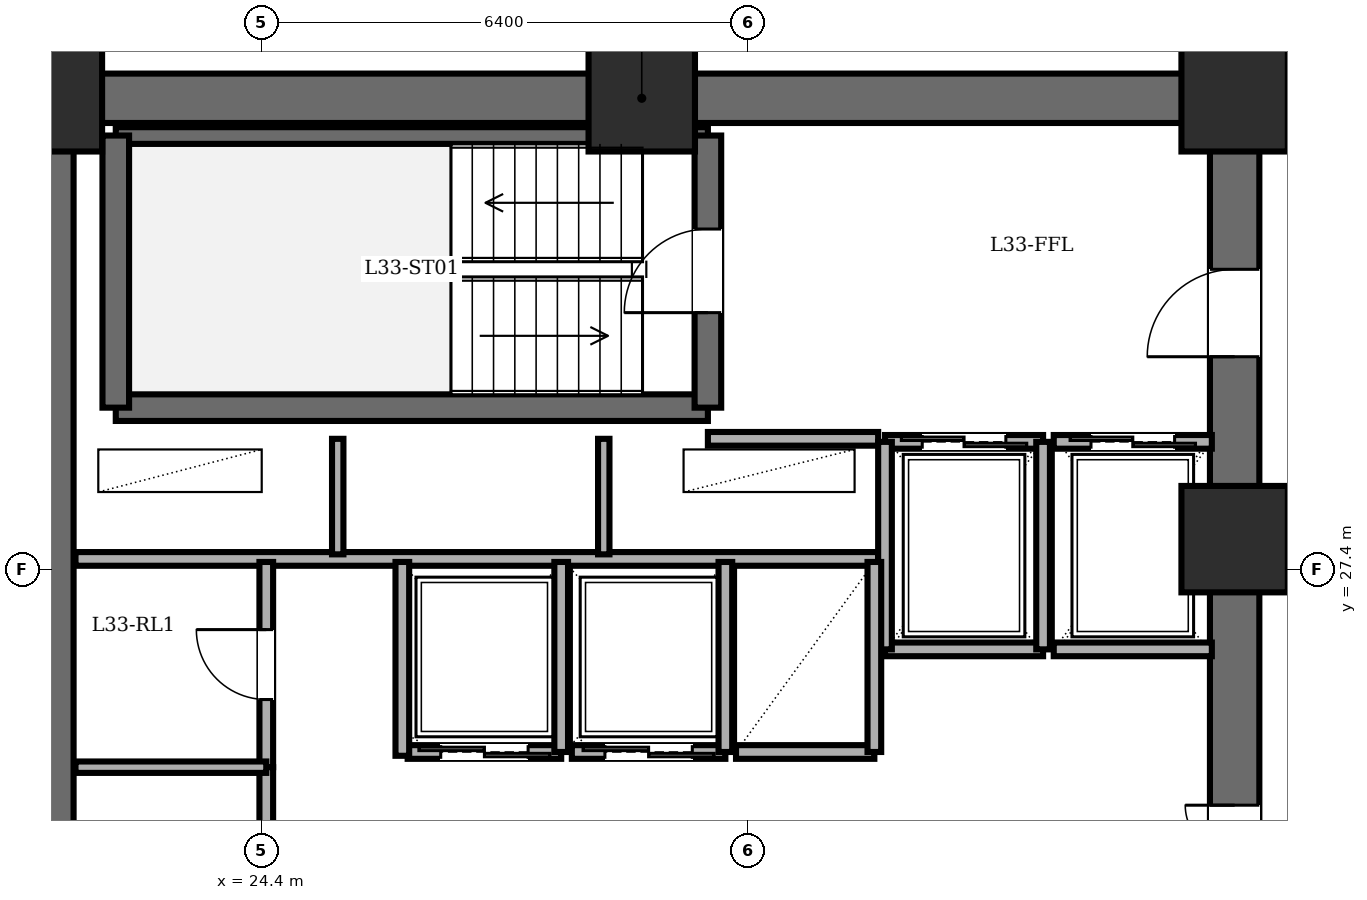
"""IFC4 building model, lengths in metres.
Left out: names, types, materials, properties, quantities, classifications, styles, units other than length and angle.
Written with IfcOpenShell. Run it as: python <this file> out.ifc"""

import sys

from ifc_helpers import new_model, si_unit, direction, frame, frame_2d, origin, origin_2d, place, context, subcontext, project, spatial, rectangle, extrude, element, fill, save


model = new_model("IFC4")
c1 = context("Model", 3, precision=1e-05, world=origin(), true_north=direction((0.0, 1.0)))
c2 = subcontext(c1, "Body", "Model", "MODEL_VIEW")
j1 = project(units=[si_unit("LENGTHUNIT", "METRE"), si_unit("PLANEANGLEUNIT", "RADIAN")], contexts=[c1])
p1 = place(None, origin())
s1 = spatial("IfcSite", under=j1, at=p1, CompositionType="ELEMENT")
p2 = place(p1, origin())
s2 = spatial("IfcBuilding", under=s1, at=p2, CompositionType="ELEMENT")
p3 = place(p2, frame((0.0, 0.0, 125.9)))
s3 = spatial("IfcBuildingStorey", under=s2, at=p3, CompositionType="ELEMENT", Elevation=125.9)
for number, where, z_axis, x_axis in (
    (1, (37.2, 27.8, 0.0), (0.0, 0.0, 1.0), (1.0, 0.0, 0.0)),
    (2, (37.2, 33.6, 0.0), (0.0, 0.0, 1.0), (1.0, 0.0, 0.0)),
    (3, (29.4, 33.6, 0.0), (0.0, 0.0, 1.0), (1.0, 0.0, 0.0)),
    (4, (21.6, 33.6, 0.0), (0.0, 0.0, 1.0), (1.0, 0.0, 0.0)),
):
    element("IfcColumn", number, at=place(p3, frame(where, z_axis=z_axis, x_axis=x_axis)), inside=s3, PredefinedType="COLUMN", context=c2, shape_type="SweptSolid", body=[
        extrude(rectangle(XDim=1.4, YDim=1.4, at=origin_2d()), origin(), (0.0, 0.0, 1.0), 3.6),
    ])
p4 = place(p3, frame((21.6, 14.4, 0.0), z_axis=(0.0, 0.0, 1.0), x_axis=(0.0, 1.0, 0.0)))
e5 = element("IfcWall", 5, at=p4, inside=s3, PredefinedType="SHEAR", context=c2, shape_type="SweptSolid", body=[
    extrude(rectangle(XDim=19.2, YDim=0.65, at=frame_2d((9.6, 0.0))), origin(), (0.0, 0.0, 1.0), 3.4),
])
p5 = place(p3, frame((21.6, 33.6, 0.0), z_axis=(0.0, 0.0, 1.0), x_axis=(1.0, 0.0, 0.0)))
e6 = element("IfcWall", 6, at=p5, inside=s3, PredefinedType="SHEAR", context=c2, shape_type="SweptSolid", body=[
    extrude(rectangle(XDim=15.6, YDim=0.65, at=frame_2d((7.8, 0.0))), origin(), (0.0, 0.0, 1.0), 3.4),
])
p6 = place(p3, frame((37.2, 14.4, 0.0), z_axis=(0.0, 0.0, 1.0), x_axis=(0.0, 1.0, 0.0)))
e7 = element("IfcWall", 7, at=p6, inside=s3, PredefinedType="SHEAR", context=c2, shape_type="SweptSolid", body=[
    extrude(rectangle(XDim=19.2, YDim=0.65, at=frame_2d((9.6, 0.0))), origin(), (0.0, 0.0, 1.0), 3.4),
])
p7 = place(p6, frame((15.8, 0.0, 0.0)))
e8 = element("IfcOpeningElement", 8, at=p7, cuts=e7, PredefinedType="OPENING", context=c2, shape_type="SweptSolid", body=[
    extrude(rectangle(XDim=1.15, YDim=2.15, at=frame_2d((0.575, 1.075))), frame((0.0, 0.335, 0.0), z_axis=(0.0, -1.0, 0.0), x_axis=(1.0, 0.0, 0.0)), (0.0, 0.0, 1.0), 0.67),
])
p8 = place(p6, frame((3.6, 0.0, 0.0)))
e9 = element("IfcOpeningElement", 9, at=p8, cuts=e7, PredefinedType="OPENING", context=c2, shape_type="SweptSolid", body=[
    extrude(rectangle(XDim=1.1, YDim=2.15, at=frame_2d((0.55, 1.075))), frame((0.0, 0.335, 0.0), z_axis=(0.0, -1.0, 0.0), x_axis=(1.0, 0.0, 0.0)), (0.0, 0.0, 1.0), 0.67),
])
p9 = place(p6, frame((8.6, 0.0, 0.0)))
e10 = element("IfcOpeningElement", 10, at=p9, cuts=e7, PredefinedType="OPENING", context=c2, shape_type="SweptSolid", body=[
    extrude(rectangle(XDim=1.3, YDim=2.2, at=frame_2d((0.65, 1.1))), frame((0.0, 0.335, 0.0), z_axis=(0.0, -1.0, 0.0), x_axis=(1.0, 0.0, 0.0)), (0.0, 0.0, 1.0), 0.67),
])
p10 = place(p3, frame((22.48, 29.53, 0.0), z_axis=(0.0, 0.0, 1.0), x_axis=(1.0, 0.0, 0.0)))
e11 = element("IfcWall", 11, at=p10, inside=s3, PredefinedType="SOLIDWALL", context=c2, shape_type="SweptSolid", body=[
    extrude(rectangle(XDim=7.79, YDim=0.35, at=frame_2d((3.895, 0.0))), origin(), (0.0, 0.0, 1.0), 3.4),
])
p11 = place(p3, frame((22.48, 33.11, 0.0), z_axis=(0.0, 0.0, 1.0), x_axis=(1.0, 0.0, 0.0)))
e12 = element("IfcWall", 12, at=p11, inside=s3, PredefinedType="PARTITIONING", context=c2, shape_type="SweptSolid", body=[
    extrude(rectangle(XDim=7.79, YDim=0.22, at=frame_2d((3.895, 0.0))), origin(), (0.0, 0.0, 1.0), 3.4),
])
p12 = place(p3, frame((22.48, 29.53, 0.0), z_axis=(0.0, 0.0, 1.0), x_axis=(0.0, 1.0, 0.0)))
e13 = element("IfcWall", 13, at=p12, inside=s3, PredefinedType="SOLIDWALL", context=c2, shape_type="SweptSolid", body=[
    extrude(rectangle(XDim=3.58, YDim=0.35, at=frame_2d((1.79, 0.0))), origin(), (0.0, 0.0, 1.0), 3.4),
])
p13 = place(p3, frame((30.27, 29.53, 0.0), z_axis=(0.0, 0.0, 1.0), x_axis=(0.0, 1.0, 0.0)))
e14 = element("IfcWall", 14, at=p13, inside=s3, PredefinedType="SOLIDWALL", context=c2, shape_type="SweptSolid", body=[
    extrude(rectangle(XDim=3.58, YDim=0.35, at=frame_2d((1.79, 0.0))), origin(), (0.0, 0.0, 1.0), 3.4),
])
p14 = place(p13, frame((1.25, 0.0, 0.0)))
e15 = element("IfcOpeningElement", 15, at=p14, cuts=e14, PredefinedType="OPENING", context=c2, shape_type="SweptSolid", body=[
    extrude(rectangle(XDim=1.1, YDim=2.15, at=frame_2d((0.55, 1.075))), frame((0.0, 0.185, 0.0), z_axis=(0.0, -1.0, 0.0), x_axis=(1.0, 0.0, 0.0)), (0.0, 0.0, 1.0), 0.37),
])
p15 = place(p3, frame((30.27, 29.12, 0.0), z_axis=(0.0, 0.0, 1.0), x_axis=(1.0, 0.0, 0.0)))
e16 = element("IfcWall", 16, at=p15, inside=s3, PredefinedType="PARTITIONING", context=c2, shape_type="SweptSolid", body=[
    extrude(rectangle(XDim=2.24, YDim=0.18, at=frame_2d((1.12, 0.0))), origin(), (0.0, 0.0, 1.0), 3.4),
])
p16 = place(p3, frame((21.95, 27.54, 0.0), z_axis=(0.0, 0.0, 1.0), x_axis=(1.0, 0.0, 0.0)))
e17 = element("IfcWall", 17, at=p16, inside=s3, PredefinedType="PARTITIONING", context=c2, shape_type="SweptSolid", body=[
    extrude(rectangle(XDim=10.56, YDim=0.18, at=frame_2d((5.28, 0.0))), origin(), (0.0, 0.0, 1.0), 3.4),
])
for number, where, z_axis, x_axis in (
    (18, (25.4, 27.6, 0.0), (0.0, 0.0, 1.0), (0.0, 1.0, 0.0)),
    (19, (28.9, 27.6, 0.0), (0.0, 0.0, 1.0), (0.0, 1.0, 0.0)),
):
    element("IfcWall", number, at=place(p3, frame(where, z_axis=z_axis, x_axis=x_axis)), inside=s3, PredefinedType="PARTITIONING", context=c2, shape_type="SweptSolid", body=[
        extrude(rectangle(XDim=1.52, YDim=0.15, at=frame_2d((0.76, 0.0))), origin(), (0.0, 0.0, 1.0), 3.4),
    ])
p17 = place(p3, frame((32.6, 29.08, 0.0), z_axis=(0.0, 0.0, 1.0), x_axis=(1.0, 0.0, 0.0)))
e20 = element("IfcWall", 20, at=p17, inside=s3, PredefinedType="PARTITIONING", context=c2, shape_type="SweptSolid", body=[
    extrude(rectangle(XDim=2.08, YDim=0.18, at=frame_2d((1.04, 0.0))), origin(), (0.0, 0.0, 1.0), 3.4),
])
p18 = place(p17, frame((0.49, 0.0, 0.0)))
e21 = element("IfcOpeningElement", 21, at=p18, cuts=e20, PredefinedType="OPENING", context=c2, shape_type="SweptSolid", body=[
    extrude(rectangle(XDim=1.1, YDim=2.2, at=frame_2d((0.55, 1.1))), frame((0.0, 0.1, 0.0), z_axis=(0.0, -1.0, 0.0), x_axis=(1.0, 0.0, 0.0)), (0.0, 0.0, 1.0), 0.2),
])
p19 = place(p3, frame((34.68, 26.35, 0.0), z_axis=(0.0, 0.0, 1.0), x_axis=(-1.0, 0.0, 0.0)))
e22 = element("IfcWall", 22, at=p19, inside=s3, PredefinedType="PARTITIONING", context=c2, shape_type="SweptSolid", body=[
    extrude(rectangle(XDim=2.08, YDim=0.18, at=frame_2d((1.04, 0.0))), origin(), (0.0, 0.0, 1.0), 3.4),
])
for number, where, z_axis, x_axis in (
    (23, (34.68, 26.35, 0.0), (0.0, 0.0, 1.0), (0.0, 1.0, 0.0)),
    (24, (32.6, 29.08, 0.0), (0.0, 0.0, 1.0), (0.0, -1.0, 0.0)),
):
    element("IfcWall", number, at=place(p3, frame(where, z_axis=z_axis, x_axis=x_axis)), inside=s3, PredefinedType="PARTITIONING", context=c2, shape_type="SweptSolid", body=[
        extrude(rectangle(XDim=2.73, YDim=0.18, at=frame_2d((1.365, 0.0))), origin(), (0.0, 0.0, 1.0), 3.4),
    ])
p20 = place(p3, frame((34.82, 29.08, 0.0), z_axis=(0.0, 0.0, 1.0), x_axis=(1.0, 0.0, 0.0)))
e25 = element("IfcWall", 25, at=p20, inside=s3, PredefinedType="PARTITIONING", context=c2, shape_type="SweptSolid", body=[
    extrude(rectangle(XDim=2.08, YDim=0.18, at=frame_2d((1.04, 0.0))), origin(), (0.0, 0.0, 1.0), 3.4),
])
p21 = place(p20, frame((0.49, 0.0, 0.0)))
e26 = element("IfcOpeningElement", 26, at=p21, cuts=e25, PredefinedType="OPENING", context=c2, shape_type="SweptSolid", body=[
    extrude(rectangle(XDim=1.1, YDim=2.2, at=frame_2d((0.55, 1.1))), frame((0.0, 0.1, 0.0), z_axis=(0.0, -1.0, 0.0), x_axis=(1.0, 0.0, 0.0)), (0.0, 0.0, 1.0), 0.2),
])
p22 = place(p3, frame((36.9, 26.35, 0.0), z_axis=(0.0, 0.0, 1.0), x_axis=(-1.0, 0.0, 0.0)))
e27 = element("IfcWall", 27, at=p22, inside=s3, PredefinedType="PARTITIONING", context=c2, shape_type="SweptSolid", body=[
    extrude(rectangle(XDim=2.08, YDim=0.18, at=frame_2d((1.04, 0.0))), origin(), (0.0, 0.0, 1.0), 3.4),
])
p23 = place(p3, frame((28.34, 25.0, 0.0), z_axis=(0.0, 0.0, 1.0), x_axis=(-1.0, 0.0, 0.0)))
e28 = element("IfcWall", 28, at=p23, inside=s3, PredefinedType="PARTITIONING", context=c2, shape_type="SweptSolid", body=[
    extrude(rectangle(XDim=2.02, YDim=0.18, at=frame_2d((1.01, 0.0))), origin(), (0.0, 0.0, 1.0), 3.4),
])
p24 = place(p23, frame((0.435, 0.0, 0.0)))
e29 = element("IfcOpeningElement", 29, at=p24, cuts=e28, PredefinedType="OPENING", context=c2, shape_type="SweptSolid", body=[
    extrude(rectangle(XDim=1.15, YDim=2.2, at=frame_2d((0.575, 1.1))), frame((0.0, 0.1, 0.0), z_axis=(0.0, -1.0, 0.0), x_axis=(1.0, 0.0, 0.0)), (0.0, 0.0, 1.0), 0.2),
])
p25 = place(p3, frame((28.34, 25.0, 0.0), z_axis=(0.0, 0.0, 1.0), x_axis=(0.0, 1.0, 0.0)))
e30 = element("IfcWall", 30, at=p25, inside=s3, PredefinedType="PARTITIONING", context=c2, shape_type="SweptSolid", body=[
    extrude(rectangle(XDim=2.5, YDim=0.18, at=frame_2d((1.25, 0.0))), origin(), (0.0, 0.0, 1.0), 3.4),
])
p26 = place(p3, frame((30.5, 25.0, 0.0), z_axis=(0.0, 0.0, 1.0), x_axis=(-1.0, 0.0, 0.0)))
e31 = element("IfcWall", 31, at=p26, inside=s3, PredefinedType="PARTITIONING", context=c2, shape_type="SweptSolid", body=[
    extrude(rectangle(XDim=2.02, YDim=0.18, at=frame_2d((1.01, 0.0))), origin(), (0.0, 0.0, 1.0), 3.4),
])
p27 = place(p26, frame((0.435, 0.0, 0.0)))
e32 = element("IfcOpeningElement", 32, at=p27, cuts=e31, PredefinedType="OPENING", context=c2, shape_type="SweptSolid", body=[
    extrude(rectangle(XDim=1.15, YDim=2.2, at=frame_2d((0.575, 1.1))), frame((0.0, 0.1, 0.0), z_axis=(0.0, -1.0, 0.0), x_axis=(1.0, 0.0, 0.0)), (0.0, 0.0, 1.0), 0.2),
])
p28 = place(p3, frame((30.5, 25.0, 0.0), z_axis=(0.0, 0.0, 1.0), x_axis=(0.0, 1.0, 0.0)))
e33 = element("IfcWall", 33, at=p28, inside=s3, PredefinedType="PARTITIONING", context=c2, shape_type="SweptSolid", body=[
    extrude(rectangle(XDim=2.5, YDim=0.18, at=frame_2d((1.25, 0.0))), origin(), (0.0, 0.0, 1.0), 3.4),
])
p29 = place(p3, frame((32.46, 25.0, 0.0), z_axis=(0.0, 0.0, 1.0), x_axis=(-1.0, 0.0, 0.0)))
e34 = element("IfcWall", 34, at=p29, inside=s3, PredefinedType="PARTITIONING", context=c2, shape_type="SweptSolid", body=[
    extrude(rectangle(XDim=1.82, YDim=0.18, at=frame_2d((0.91, 0.0))), origin(), (0.0, 0.0, 1.0), 3.4),
])
p30 = place(p3, frame((32.46, 25.0, 0.0), z_axis=(0.0, 0.0, 1.0), x_axis=(0.0, 1.0, 0.0)))
e35 = element("IfcWall", 35, at=p30, inside=s3, PredefinedType="PARTITIONING", context=c2, shape_type="SweptSolid", body=[
    extrude(rectangle(XDim=2.5, YDim=0.18, at=frame_2d((1.25, 0.0))), origin(), (0.0, 0.0, 1.0), 3.4),
])
p31 = place(p3, frame((24.46, 24.8, 0.0), z_axis=(0.0, 0.0, 1.0), x_axis=(0.0, 1.0, 0.0)))
e36 = element("IfcWall", 36, at=p31, inside=s3, PredefinedType="PARTITIONING", context=c2, shape_type="SweptSolid", body=[
    extrude(rectangle(XDim=2.7, YDim=0.18, at=frame_2d((1.35, 0.0))), origin(), (0.0, 0.0, 1.0), 3.4),
])
p32 = place(p31, frame((0.89, 0.0, 0.0)))
e37 = element("IfcOpeningElement", 37, at=p32, cuts=e36, PredefinedType="OPENING", context=c2, shape_type="SweptSolid", body=[
    extrude(rectangle(XDim=0.92, YDim=2.1, at=frame_2d((0.46, 1.05))), frame((0.0, 0.1, 0.0), z_axis=(0.0, -1.0, 0.0), x_axis=(1.0, 0.0, 0.0)), (0.0, 0.0, 1.0), 0.2),
])
p33 = place(p3, frame((24.46, 19.8, 0.0), z_axis=(0.0, 0.0, 1.0), x_axis=(0.0, 1.0, 0.0)))
e38 = element("IfcWall", 38, at=p33, inside=s3, PredefinedType="PARTITIONING", context=c2, shape_type="SweptSolid", body=[
    extrude(rectangle(XDim=5.0, YDim=0.18, at=frame_2d((2.5, 0.0))), origin(), (0.0, 0.0, 1.0), 3.4),
])
p34 = place(p33, frame((2.04, 0.0, 0.0)))
e39 = element("IfcOpeningElement", 39, at=p34, cuts=e38, PredefinedType="OPENING", context=c2, shape_type="SweptSolid", body=[
    extrude(rectangle(XDim=0.92, YDim=2.1, at=frame_2d((0.46, 1.05))), frame((0.0, 0.1, 0.0), z_axis=(0.0, -1.0, 0.0), x_axis=(1.0, 0.0, 0.0)), (0.0, 0.0, 1.0), 0.2),
])
p35 = place(p3, frame((21.95, 24.8, 0.0), z_axis=(0.0, 0.0, 1.0), x_axis=(1.0, 0.0, 0.0)))
e40 = element("IfcWall", 40, at=p35, inside=s3, PredefinedType="PARTITIONING", context=c2, shape_type="SweptSolid", body=[
    extrude(rectangle(XDim=2.51, YDim=0.15, at=frame_2d((1.255, 0.0))), origin(), (0.0, 0.0, 1.0), 3.4),
])
p36 = place(p3, frame((26.25, 24.95, 0.0), z_axis=(0.0, 0.0, 1.0), x_axis=(0.0, 1.0, 0.0)))
e41 = element("IfcWall", 41, at=p36, inside=s3, PredefinedType="PARTITIONING", context=c2, shape_type="SweptSolid", body=[
    extrude(rectangle(XDim=2.55, YDim=0.18, at=frame_2d((1.275, 0.0))), origin(), (0.0, 0.0, 1.0), 3.4),
])
p37 = place(p14, origin())
e42 = element("IfcDoor", 42, at=p37, inside=s3, OperationType="SINGLE_SWING_LEFT", PredefinedType="DOOR", context=c2, shape_type="SweptSolid", body=[
    extrude(rectangle(XDim=1.1, YDim=2.15, at=frame_2d((0.55, 1.075))), frame((0.0, 0.025, 0.0), z_axis=(0.0, -1.0, 0.0), x_axis=(1.0, 0.0, 0.0)), (0.0, 0.0, 1.0), 0.05),
])
fill(e15, e42)
p38 = place(p7, origin())
e43 = element("IfcDoor", 43, at=p38, inside=s3, OperationType="SINGLE_SWING_LEFT", PredefinedType="DOOR", context=c2, shape_type="SweptSolid", body=[
    extrude(rectangle(XDim=1.15, YDim=2.15, at=frame_2d((0.575, 1.075))), frame((0.0, 0.025, 0.0), z_axis=(0.0, -1.0, 0.0), x_axis=(1.0, 0.0, 0.0)), (0.0, 0.0, 1.0), 0.05),
])
fill(e8, e43)
p39 = place(p18, origin())
e44 = element("IfcDoor", 44, at=p39, inside=s3, OperationType="DOUBLE_DOOR_SLIDING", PredefinedType="DOOR", context=c2, shape_type="SweptSolid", body=[
    extrude(rectangle(XDim=1.1, YDim=2.2, at=frame_2d((0.55, 1.1))), frame((0.0, 0.025, 0.0), z_axis=(0.0, -1.0, 0.0), x_axis=(1.0, 0.0, 0.0)), (0.0, 0.0, 1.0), 0.05),
])
fill(e21, e44)
p40 = place(p21, origin())
e45 = element("IfcDoor", 45, at=p40, inside=s3, OperationType="DOUBLE_DOOR_SLIDING", PredefinedType="DOOR", context=c2, shape_type="SweptSolid", body=[
    extrude(rectangle(XDim=1.1, YDim=2.2, at=frame_2d((0.55, 1.1))), frame((0.0, 0.025, 0.0), z_axis=(0.0, -1.0, 0.0), x_axis=(1.0, 0.0, 0.0)), (0.0, 0.0, 1.0), 0.05),
])
fill(e26, e45)
p41 = place(p24, origin())
e46 = element("IfcDoor", 46, at=p41, inside=s3, OperationType="DOUBLE_DOOR_SLIDING", PredefinedType="DOOR", context=c2, shape_type="SweptSolid", body=[
    extrude(rectangle(XDim=1.15, YDim=2.2, at=frame_2d((0.575, 1.1))), frame((0.0, 0.025, 0.0), z_axis=(0.0, -1.0, 0.0), x_axis=(1.0, 0.0, 0.0)), (0.0, 0.0, 1.0), 0.05),
])
fill(e29, e46)
p42 = place(p27, origin())
e47 = element("IfcDoor", 47, at=p42, inside=s3, OperationType="DOUBLE_DOOR_SLIDING", PredefinedType="DOOR", context=c2, shape_type="SweptSolid", body=[
    extrude(rectangle(XDim=1.15, YDim=2.2, at=frame_2d((0.575, 1.1))), frame((0.0, 0.025, 0.0), z_axis=(0.0, -1.0, 0.0), x_axis=(1.0, 0.0, 0.0)), (0.0, 0.0, 1.0), 0.05),
])
fill(e32, e47)
p43 = place(p32, origin())
e48 = element("IfcDoor", 48, at=p43, inside=s3, OperationType="SINGLE_SWING_RIGHT", PredefinedType="DOOR", context=c2, shape_type="SweptSolid", body=[
    extrude(rectangle(XDim=0.92, YDim=2.1, at=frame_2d((0.46, 1.05))), frame((0.0, 0.025, 0.0), z_axis=(0.0, -1.0, 0.0), x_axis=(1.0, 0.0, 0.0)), (0.0, 0.0, 1.0), 0.05),
])
fill(e37, e48)
p44 = place(p9, origin())
e49 = element("IfcDoor", 49, at=p44, inside=s3, OperationType="DOUBLE_DOOR_SINGLE_SWING", PredefinedType="DOOR", context=c2, shape_type="SweptSolid", body=[
    extrude(rectangle(XDim=1.3, YDim=2.2, at=frame_2d((0.65, 1.1))), frame((0.0, 0.025, 0.0), z_axis=(0.0, -1.0, 0.0), x_axis=(1.0, 0.0, 0.0)), (0.0, 0.0, 1.0), 0.05),
])
fill(e10, e49)
save(model, sys.argv[1])
